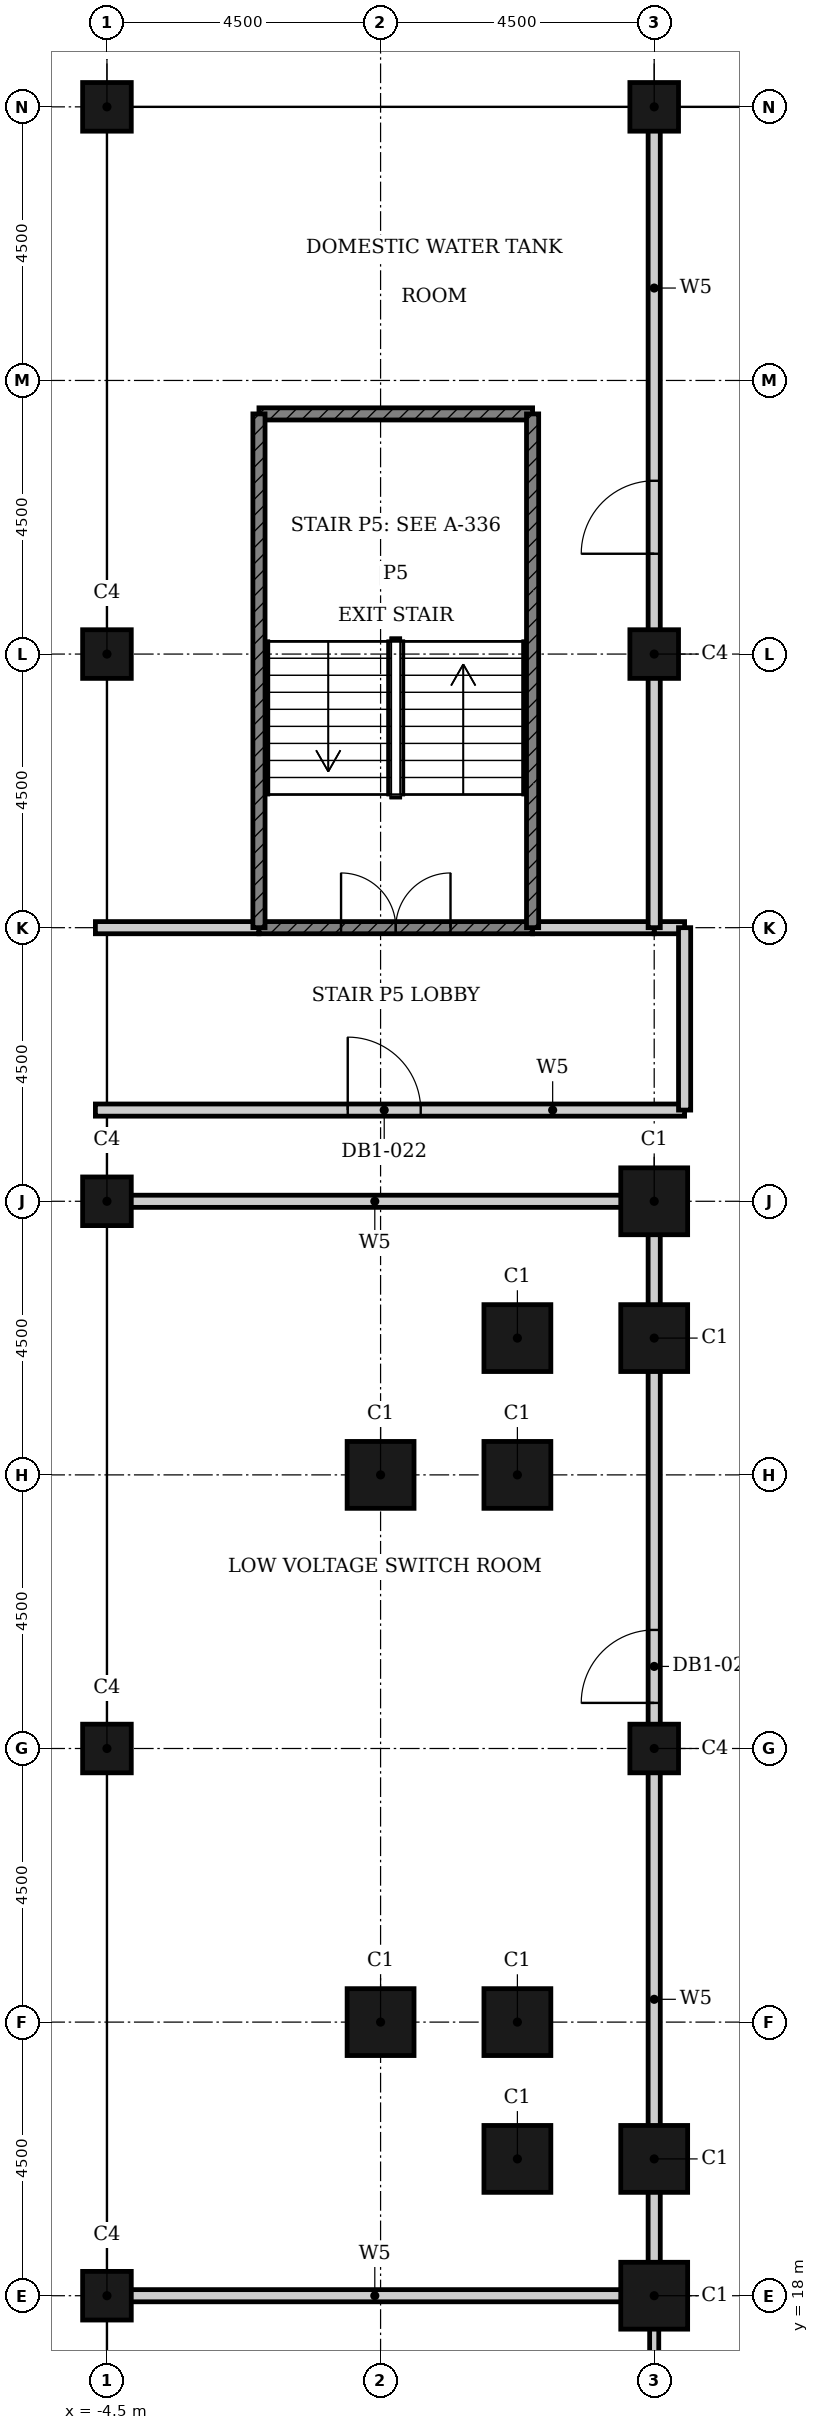
"""IFC4 building model, lengths in metres.
Left out: names, types, materials, properties, quantities, classifications, styles, units other than length and angle.
Written with IfcOpenShell. Run it as: python <this file> out.ifc"""

import sys

from ifc_helpers import new_model, si_unit, direction, frame, frame_2d, origin, origin_2d, place, context, subcontext, project, spatial, rectangle, hollow_rectangle, extrude, element, fill, save


model = new_model("IFC4")
c1 = context("Model", 3, precision=1e-05, world=origin(), true_north=direction((0.0, 1.0)))
c2 = subcontext(c1, "Body", "Model", "MODEL_VIEW")
j1 = project(units=[si_unit("LENGTHUNIT", "METRE"), si_unit("PLANEANGLEUNIT", "RADIAN")], contexts=[c1])
p1 = place(None, origin())
s1 = spatial("IfcSite", under=j1, at=p1, CompositionType="ELEMENT")
p2 = place(p1, origin())
s2 = spatial("IfcBuilding", under=s1, at=p2, CompositionType="ELEMENT")
p3 = place(p2, frame((0.0, 0.0, -6.0)))
s3 = spatial("IfcBuildingStorey", under=s2, at=p3, CompositionType="ELEMENT", Elevation=-6.0)
for number, where, z_axis, x_axis in (
    (1, (4.5, 36.0, -0.5), (0.0, 0.0, 1.0), (1.0, 0.0, 0.0)),
    (2, (4.5, 33.75, -0.5), (0.0, 0.0, 1.0), (1.0, 0.0, 0.0)),
    (3, (2.25, 33.75, -0.5), (0.0, 0.0, 1.0), (1.0, 0.0, 0.0)),
    (4, (2.25, 31.5, -0.5), (0.0, 0.0, 1.0), (1.0, 0.0, 0.0)),
    (5, (0.0, 31.5, -0.5), (0.0, 0.0, 1.0), (1.0, 0.0, 0.0)),
    (6, (0.0, 22.5, -0.5), (0.0, 0.0, 1.0), (1.0, 0.0, 0.0)),
    (7, (2.25, 22.5, -0.5), (0.0, 0.0, 1.0), (1.0, 0.0, 0.0)),
    (8, (2.25, 20.25, -0.5), (0.0, 0.0, 1.0), (1.0, 0.0, 0.0)),
    (9, (4.5, 20.25, -0.5), (0.0, 0.0, 1.0), (1.0, 0.0, 0.0)),
    (10, (4.5, 18.0, -0.5), (0.0, 0.0, 1.0), (1.0, 0.0, 0.0)),
):
    element("IfcColumn", number, at=place(p3, frame(where, z_axis=z_axis, x_axis=x_axis)), inside=s3, PredefinedType="COLUMN", context=c2, shape_type="SweptSolid", body=[
        extrude(hollow_rectangle(XDim=1.1, YDim=1.1, WallThickness=0.036, at=origin_2d()), origin(), (0.0, 0.0, 1.0), 6.5),
    ])
for number, where, z_axis, x_axis in (
    (11, (-4.5, 18.0, -0.5), (0.0, 0.0, 1.0), (1.0, 0.0, 0.0)),
    (12, (-4.5, 27.0, -0.5), (0.0, 0.0, 1.0), (1.0, 0.0, 0.0)),
    (13, (-4.5, 36.0, -0.5), (0.0, 0.0, 1.0), (1.0, 0.0, 0.0)),
    (14, (-4.5, 45.0, -0.5), (0.0, 0.0, 1.0), (1.0, 0.0, 0.0)),
    (15, (-4.5, 54.0, -0.5), (0.0, 0.0, 1.0), (1.0, 0.0, 0.0)),
    (16, (4.5, 54.0, -0.5), (0.0, 0.0, 1.0), (1.0, 0.0, 0.0)),
    (17, (4.5, 27.0, -0.5), (0.0, 0.0, 1.0), (1.0, 0.0, 0.0)),
    (18, (4.5, 45.0, -0.5), (0.0, 0.0, 1.0), (1.0, 0.0, 0.0)),
):
    element("IfcColumn", number, at=place(p3, frame(where, z_axis=z_axis, x_axis=x_axis)), inside=s3, PredefinedType="COLUMN", context=c2, shape_type="SweptSolid", body=[
        extrude(hollow_rectangle(XDim=0.8, YDim=0.8, WallThickness=0.025, at=origin_2d()), origin(), (0.0, 0.0, 1.0), 6.5),
    ])
p4 = place(p3, frame((4.5, 9.0, 0.0), z_axis=(0.0, 0.0, 1.0), x_axis=(0.0, 1.0, 0.0)))
e19 = element("IfcWall", 19, at=p4, inside=s3, PredefinedType="PARTITIONING", context=c2, shape_type="SweptSolid", body=[
    extrude(rectangle(XDim=9.0, YDim=0.15, at=frame_2d((4.5, 0.0))), origin(), (0.0, 0.0, 1.0), 5.6),
])
p5 = place(p4, frame((4.05, 0.0, 0.0)))
e20 = element("IfcOpeningElement", 20, at=p5, cuts=e19, PredefinedType="OPENING", context=c2, shape_type="SweptSolid", body=[
    extrude(rectangle(XDim=0.9, YDim=2.1, at=frame_2d((0.45, 1.05))), frame((0.0, 0.085, 0.0), z_axis=(0.0, -1.0, 0.0), x_axis=(1.0, 0.0, 0.0)), (0.0, 0.0, 1.0), 0.17),
])
for number, where, z_axis, x_axis in (
    (21, (-4.69, 18.0, 0.0), (0.0, 0.0, 1.0), (1.0, 0.0, 0.0)),
    (22, (-4.69, 36.0, 0.0), (0.0, 0.0, 1.0), (1.0, 0.0, 0.0)),
):
    element("IfcWall", number, at=place(p3, frame(where, z_axis=z_axis, x_axis=x_axis)), inside=s3, PredefinedType="PARTITIONING", context=c2, shape_type="SweptSolid", body=[
        extrude(rectangle(XDim=9.19, YDim=0.2, at=frame_2d((4.595, 0.0))), origin(), (0.0, 0.0, 1.0), 5.6),
    ])
p6 = place(p3, frame((-4.69, 37.5, 0.0), z_axis=(0.0, 0.0, 1.0), x_axis=(1.0, 0.0, 0.0)))
e23 = element("IfcWall", 23, at=p6, inside=s3, PredefinedType="PARTITIONING", context=c2, shape_type="SweptSolid", body=[
    extrude(rectangle(XDim=9.69, YDim=0.2, at=frame_2d((4.845, 0.0))), origin(), (0.0, 0.0, 1.0), 5.6),
])
p7 = place(p6, frame((4.15, 0.0, 0.0)))
e24 = element("IfcOpeningElement", 24, at=p7, cuts=e23, PredefinedType="OPENING", context=c2, shape_type="SweptSolid", body=[
    extrude(rectangle(XDim=1.2, YDim=2.1, at=frame_2d((0.6, 1.05))), frame((0.0, 0.11, 0.0), z_axis=(0.0, -1.0, 0.0), x_axis=(1.0, 0.0, 0.0)), (0.0, 0.0, 1.0), 0.22),
])
p8 = place(p3, frame((4.5, 40.5, 0.0), z_axis=(0.0, 0.0, 1.0), x_axis=(1.0, 0.0, 0.0)))
e25 = element("IfcWall", 25, at=p8, inside=s3, PredefinedType="PARTITIONING", context=c2, shape_type="SweptSolid", body=[
    extrude(rectangle(XDim=0.5, YDim=0.2, at=frame_2d((0.25, 0.0))), origin(), (0.0, 0.0, 1.0), 5.6),
])
p9 = place(p3, frame((-4.69, 40.5, 0.0), z_axis=(0.0, 0.0, 1.0), x_axis=(1.0, 0.0, 0.0)))
e26 = element("IfcWall", 26, at=p9, inside=s3, PredefinedType="PARTITIONING", context=c2, shape_type="SweptSolid", body=[
    extrude(rectangle(XDim=2.69, YDim=0.2, at=frame_2d((1.345, 0.0))), origin(), (0.0, 0.0, 1.0), 5.6),
])
p10 = place(p3, frame((2.5, 40.5, 0.0), z_axis=(0.0, 0.0, 1.0), x_axis=(1.0, 0.0, 0.0)))
e27 = element("IfcWall", 27, at=p10, inside=s3, PredefinedType="PARTITIONING", context=c2, shape_type="SweptSolid", body=[
    extrude(rectangle(XDim=2.0, YDim=0.2, at=frame_2d((1.0, 0.0))), origin(), (0.0, 0.0, 1.0), 5.6),
])
p11 = place(p3, frame((4.5, 18.0, 0.0), z_axis=(0.0, 0.0, 1.0), x_axis=(0.0, 1.0, 0.0)))
e28 = element("IfcWall", 28, at=p11, inside=s3, PredefinedType="PARTITIONING", context=c2, shape_type="SweptSolid", body=[
    extrude(rectangle(XDim=18.0, YDim=0.2, at=frame_2d((9.0, 0.0))), origin(), (0.0, 0.0, 1.0), 5.6),
])
p12 = place(p11, frame((9.75, 0.0, 0.0)))
e29 = element("IfcOpeningElement", 29, at=p12, cuts=e28, PredefinedType="OPENING", context=c2, shape_type="SweptSolid", body=[
    extrude(rectangle(XDim=1.2, YDim=2.1, at=frame_2d((0.6, 1.05))), frame((0.0, 0.11, 0.0), z_axis=(0.0, -1.0, 0.0), x_axis=(1.0, 0.0, 0.0)), (0.0, 0.0, 1.0), 0.22),
])
p13 = place(p3, frame((4.5, 40.5, 0.0), z_axis=(0.0, 0.0, 1.0), x_axis=(0.0, 1.0, 0.0)))
e30 = element("IfcWall", 30, at=p13, inside=s3, PredefinedType="PARTITIONING", context=c2, shape_type="SweptSolid", body=[
    extrude(rectangle(XDim=13.69, YDim=0.2, at=frame_2d((6.845, 0.0))), origin(), (0.0, 0.0, 1.0), 5.6),
])
p14 = place(p13, frame((6.15, 0.0, 0.0)))
e31 = element("IfcOpeningElement", 31, at=p14, cuts=e30, PredefinedType="OPENING", context=c2, shape_type="SweptSolid", body=[
    extrude(rectangle(XDim=1.2, YDim=2.1, at=frame_2d((0.6, 1.05))), frame((0.0, 0.11, 0.0), z_axis=(0.0, -1.0, 0.0), x_axis=(1.0, 0.0, 0.0)), (0.0, 0.0, 1.0), 0.22),
])
p15 = place(p3, frame((5.0, 37.5, 0.0), z_axis=(0.0, 0.0, 1.0), x_axis=(0.0, 1.0, 0.0)))
e32 = element("IfcWall", 32, at=p15, inside=s3, PredefinedType="PARTITIONING", context=c2, shape_type="SweptSolid", body=[
    extrude(rectangle(XDim=3.0, YDim=0.2, at=frame_2d((1.5, 0.0))), origin(), (0.0, 0.0, 1.0), 5.6),
])
p16 = place(p3, frame((-2.0, 40.5, 0.0), z_axis=(0.0, 0.0, 1.0), x_axis=(1.0, 0.0, 0.0)))
e33 = element("IfcWall", 33, at=p16, inside=s3, PredefinedType="SHEAR", context=c2, shape_type="SweptSolid", body=[
    extrude(rectangle(XDim=4.5, YDim=0.2, at=frame_2d((2.25, 0.0))), origin(), (0.0, 0.0, 1.0), 5.6),
])
p17 = place(p16, frame((1.35, 0.0, 0.0)))
e34 = element("IfcOpeningElement", 34, at=p17, cuts=e33, PredefinedType="OPENING", context=c2, shape_type="SweptSolid", body=[
    extrude(rectangle(XDim=1.8, YDim=2.1, at=frame_2d((0.9, 1.05))), frame((0.0, 0.11, 0.0), z_axis=(0.0, -1.0, 0.0), x_axis=(1.0, 0.0, 0.0)), (0.0, 0.0, 1.0), 0.22),
])
p18 = place(p3, frame((-2.0, 48.95, 0.0), z_axis=(0.0, 0.0, 1.0), x_axis=(1.0, 0.0, 0.0)))
e35 = element("IfcWall", 35, at=p18, inside=s3, PredefinedType="SHEAR", context=c2, shape_type="SweptSolid", body=[
    extrude(rectangle(XDim=4.5, YDim=0.2, at=frame_2d((2.25, 0.0))), origin(), (0.0, 0.0, 1.0), 5.6),
])
for number, where, z_axis, x_axis in (
    (36, (-2.0, 40.5, 0.0), (0.0, 0.0, 1.0), (0.0, 1.0, 0.0)),
    (37, (2.5, 40.5, 0.0), (0.0, 0.0, 1.0), (0.0, 1.0, 0.0)),
):
    element("IfcWall", number, at=place(p3, frame(where, z_axis=z_axis, x_axis=x_axis)), inside=s3, PredefinedType="SHEAR", context=c2, shape_type="SweptSolid", body=[
        extrude(rectangle(XDim=8.45, YDim=0.2, at=frame_2d((4.225, 0.0))), origin(), (0.0, 0.0, 1.0), 5.6),
    ])
p19 = place(p7, origin())
e38 = element("IfcDoor", 38, at=p19, inside=s3, OperationType="SINGLE_SWING_RIGHT", PredefinedType="DOOR", context=c2, shape_type="SweptSolid", body=[
    extrude(rectangle(XDim=1.2, YDim=2.1, at=frame_2d((0.6, 1.05))), frame((0.0, 0.025, 0.0), z_axis=(0.0, -1.0, 0.0), x_axis=(1.0, 0.0, 0.0)), (0.0, 0.0, 1.0), 0.05),
])
fill(e24, e38)
p20 = place(p17, origin())
e39 = element("IfcDoor", 39, at=p20, inside=s3, OperationType="DOUBLE_DOOR_SINGLE_SWING", PredefinedType="DOOR", context=c2, shape_type="SweptSolid", body=[
    extrude(rectangle(XDim=1.8, YDim=2.1, at=frame_2d((0.9, 1.05))), frame((0.0, 0.025, 0.0), z_axis=(0.0, -1.0, 0.0), x_axis=(1.0, 0.0, 0.0)), (0.0, 0.0, 1.0), 0.05),
])
fill(e34, e39)
p21 = place(p12, origin())
e40 = element("IfcDoor", 40, at=p21, inside=s3, OperationType="SINGLE_SWING_RIGHT", PredefinedType="DOOR", context=c2, shape_type="SweptSolid", body=[
    extrude(rectangle(XDim=1.2, YDim=2.1, at=frame_2d((0.6, 1.05))), frame((0.0, 0.025, 0.0), z_axis=(0.0, -1.0, 0.0), x_axis=(1.0, 0.0, 0.0)), (0.0, 0.0, 1.0), 0.05),
])
fill(e29, e40)
p22 = place(p14, origin())
e41 = element("IfcDoor", 41, at=p22, inside=s3, OperationType="SINGLE_SWING_LEFT", PredefinedType="DOOR", context=c2, shape_type="SweptSolid", body=[
    extrude(rectangle(XDim=1.2, YDim=2.1, at=frame_2d((0.6, 1.05))), frame((0.0, 0.025, 0.0), z_axis=(0.0, -1.0, 0.0), x_axis=(1.0, 0.0, 0.0)), (0.0, 0.0, 1.0), 0.05),
])
fill(e31, e41)
save(model, sys.argv[1])
